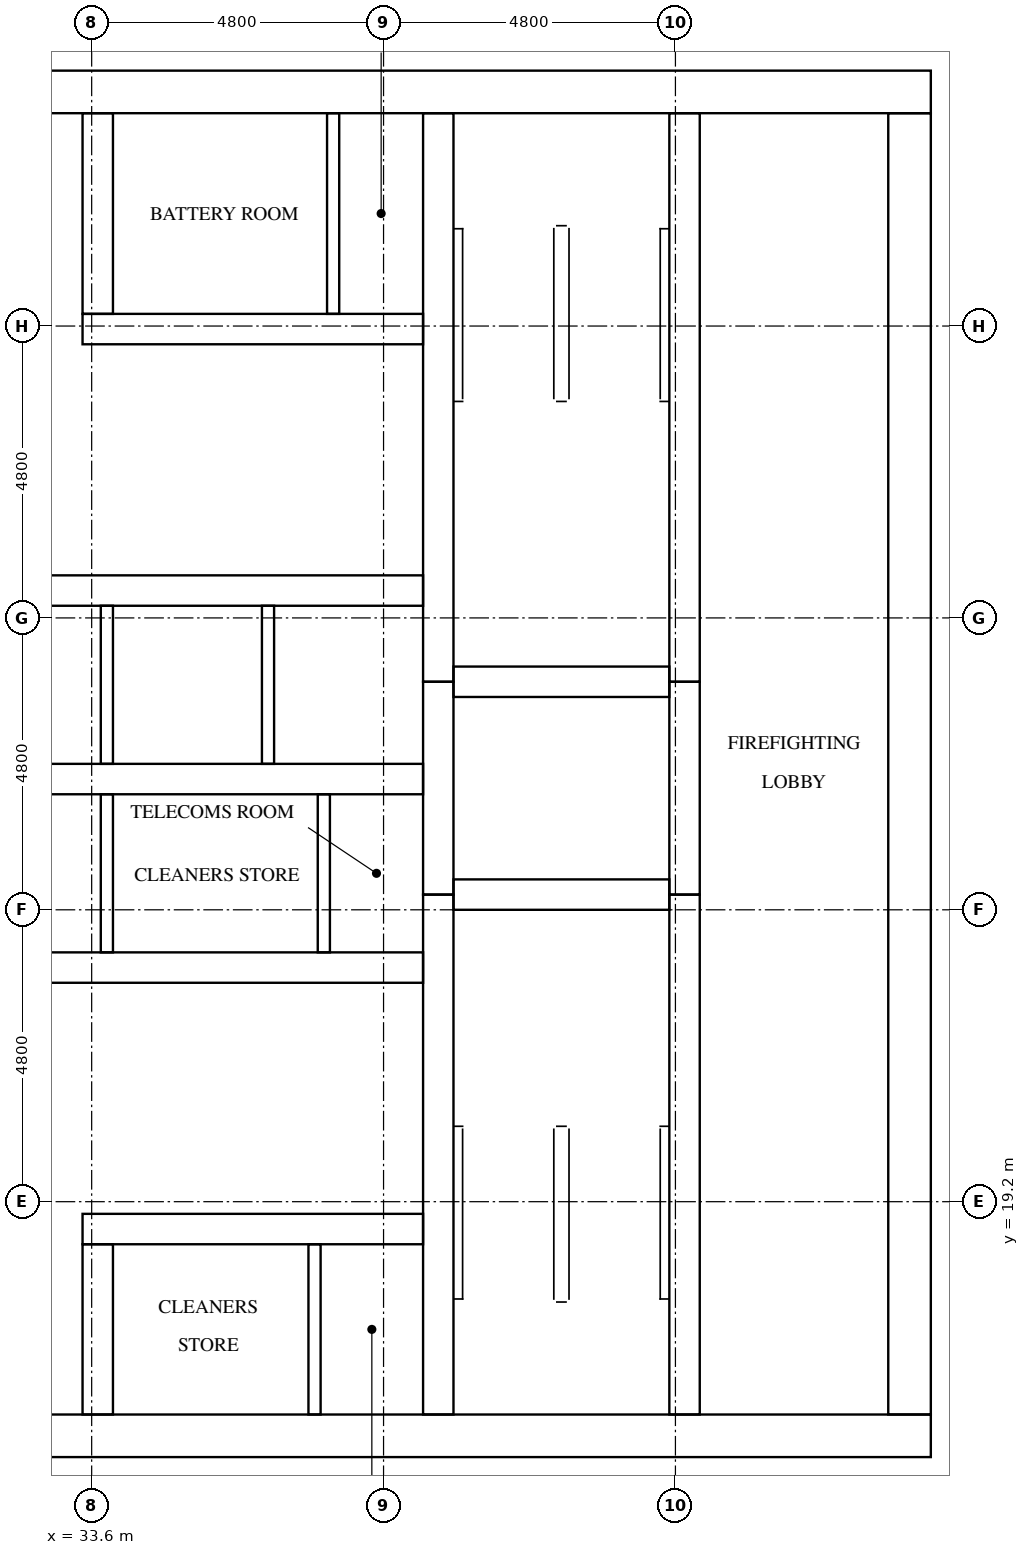
"""IFC4 building model, lengths in metres.
Left out: names, types, materials, properties, quantities, classifications, styles, units other than length and angle.
Written with IfcOpenShell. Run it as: python <this file> out.ifc"""

import sys

from ifc_helpers import new_model, si_unit, direction, frame, frame_2d, origin, place, context, subcontext, project, spatial, rectangle, extrude, element, fill, save


model = new_model("IFC4")
c1 = context("Model", 3, precision=1e-05, world=origin(), true_north=direction((0.0, 1.0)))
c2 = subcontext(c1, "Body", "Model", "MODEL_VIEW")
j1 = project(units=[si_unit("LENGTHUNIT", "METRE"), si_unit("PLANEANGLEUNIT", "RADIAN")], contexts=[c1])
p1 = place(None, origin())
s1 = spatial("IfcSite", under=j1, at=p1, CompositionType="ELEMENT")
p2 = place(p1, origin())
s2 = spatial("IfcBuilding", under=s1, at=p2, CompositionType="ELEMENT")
p3 = place(p2, frame((0.0, 0.0, 226.3)))
s3 = spatial("IfcBuildingStorey", under=s2, at=p3, CompositionType="ELEMENT", Elevation=226.3)
p4 = place(p3, frame((15.0, 15.35, 0.0), z_axis=(0.0, 0.0, 1.0), x_axis=(1.0, 0.0, 0.0)))
e1 = element("IfcWall", 1, at=p4, inside=s3, PredefinedType="SHEAR", context=c2, shape_type="SweptSolid", body=[
    extrude(rectangle(XDim=32.4, YDim=0.7, at=frame_2d((16.2, 0.0))), origin(), (0.0, 0.0, 1.0), 3.2),
])
p5 = place(p4, frame((15.3, 0.0, 0.0)))
e2 = element("IfcOpeningElement", 2, at=p5, cuts=e1, PredefinedType="OPENING", context=c2, shape_type="SweptSolid", body=[
    extrude(rectangle(XDim=1.8, YDim=2.1, at=frame_2d((0.9, 1.05))), frame((0.0, 0.36, 0.0), z_axis=(0.0, -1.0, 0.0), x_axis=(1.0, 0.0, 0.0)), (0.0, 0.0, 1.0), 0.72),
])
p6 = place(p3, frame((15.0, 37.45, 0.0), z_axis=(0.0, 0.0, 1.0), x_axis=(1.0, 0.0, 0.0)))
e3 = element("IfcWall", 3, at=p6, inside=s3, PredefinedType="SHEAR", context=c2, shape_type="SweptSolid", body=[
    extrude(rectangle(XDim=32.4, YDim=0.7, at=frame_2d((16.2, 0.0))), origin(), (0.0, 0.0, 1.0), 3.2),
])
p7 = place(p6, frame((15.3, 0.0, 0.0)))
e4 = element("IfcOpeningElement", 4, at=p7, cuts=e3, PredefinedType="OPENING", context=c2, shape_type="SweptSolid", body=[
    extrude(rectangle(XDim=1.8, YDim=2.1, at=frame_2d((0.9, 1.05))), frame((0.0, 0.36, 0.0), z_axis=(0.0, -1.0, 0.0), x_axis=(1.0, 0.0, 0.0)), (0.0, 0.0, 1.0), 0.72),
])
p8 = place(p6, frame((1.544, 0.0, 0.0)))
e5 = element("IfcOpeningElement", 5, at=p8, cuts=e3, PredefinedType="OPENING", context=c2, shape_type="SweptSolid", body=[
    extrude(rectangle(XDim=1.0, YDim=2.1, at=frame_2d((0.5, 1.05))), frame((0.0, 0.36, 0.0), z_axis=(0.0, -1.0, 0.0), x_axis=(1.0, 0.0, 0.0)), (0.0, 0.0, 1.0), 0.72),
])
p9 = place(p6, frame((5.219, 0.0, 0.0)))
e6 = element("IfcOpeningElement", 6, at=p9, cuts=e3, PredefinedType="OPENING", context=c2, shape_type="SweptSolid", body=[
    extrude(rectangle(XDim=1.0, YDim=2.1, at=frame_2d((0.5, 1.05))), frame((0.0, 0.36, 0.0), z_axis=(0.0, -1.0, 0.0), x_axis=(1.0, 0.0, 0.0)), (0.0, 0.0, 1.0), 0.72),
])
p10 = place(p3, frame((47.05, 15.7, 0.0), z_axis=(0.0, 0.0, 1.0), x_axis=(0.0, 1.0, 0.0)))
e7 = element("IfcWall", 7, at=p10, inside=s3, PredefinedType="SHEAR", context=c2, shape_type="SweptSolid", body=[
    extrude(rectangle(XDim=21.4, YDim=0.7, at=frame_2d((10.7, 0.0))), origin(), (0.0, 0.0, 1.0), 3.2),
])
p11 = place(p10, frame((10.4, 0.0, 0.0)))
e8 = element("IfcOpeningElement", 8, at=p11, cuts=e7, PredefinedType="OPENING", context=c2, shape_type="SweptSolid", body=[
    extrude(rectangle(XDim=1.2, YDim=2.1, at=frame_2d((0.6, 1.05))), frame((0.0, 0.36, 0.0), z_axis=(0.0, -1.0, 0.0), x_axis=(1.0, 0.0, 0.0)), (0.0, 0.0, 1.0), 0.72),
])
p12 = place(p3, frame((39.3, 15.7, 0.0), z_axis=(0.0, 0.0, 1.0), x_axis=(0.0, 1.0, 0.0)))
e9 = element("IfcWall", 9, at=p12, inside=s3, PredefinedType="SHEAR", context=c2, shape_type="SweptSolid", body=[
    extrude(rectangle(XDim=8.55, YDim=0.5, at=frame_2d((4.275, 0.0))), origin(), (0.0, 0.0, 1.0), 3.2),
])
p13 = place(p3, frame((39.3, 24.25, 0.0), z_axis=(0.0, 0.0, 1.0), x_axis=(0.0, 1.0, 0.0)))
e10 = element("IfcWall", 10, at=p13, inside=s3, PredefinedType="SHEAR", context=c2, shape_type="SweptSolid", body=[
    extrude(rectangle(XDim=3.5, YDim=0.5, at=frame_2d((1.75, 0.0))), origin(), (0.0, 0.0, 1.0), 3.2),
])
p14 = place(p3, frame((39.3, 27.75, 0.0), z_axis=(0.0, 0.0, 1.0), x_axis=(0.0, 1.0, 0.0)))
e11 = element("IfcWall", 11, at=p14, inside=s3, PredefinedType="SHEAR", context=c2, shape_type="SweptSolid", body=[
    extrude(rectangle(XDim=9.35, YDim=0.5, at=frame_2d((4.675, 0.0))), origin(), (0.0, 0.0, 1.0), 3.2),
])
p15 = place(p3, frame((43.35, 15.7, 0.0), z_axis=(0.0, 0.0, 1.0), x_axis=(0.0, 1.0, 0.0)))
e12 = element("IfcWall", 12, at=p15, inside=s3, PredefinedType="SHEAR", context=c2, shape_type="SweptSolid", body=[
    extrude(rectangle(XDim=8.55, YDim=0.5, at=frame_2d((4.275, 0.0))), origin(), (0.0, 0.0, 1.0), 3.2),
])
p16 = place(p15, frame((0.5, 0.0, 0.0)))
e13 = element("IfcOpeningElement", 13, at=p16, cuts=e12, PredefinedType="OPENING", context=c2, shape_type="SweptSolid", body=[
    extrude(rectangle(XDim=1.2, YDim=2.1, at=frame_2d((0.6, 1.05))), frame((0.0, 0.26, 0.0), z_axis=(0.0, -1.0, 0.0), x_axis=(1.0, 0.0, 0.0)), (0.0, 0.0, 1.0), 0.52),
])
p17 = place(p3, frame((43.35, 24.25, 0.0), z_axis=(0.0, 0.0, 1.0), x_axis=(0.0, 1.0, 0.0)))
e14 = element("IfcWall", 14, at=p17, inside=s3, PredefinedType="SHEAR", context=c2, shape_type="SweptSolid", body=[
    extrude(rectangle(XDim=3.5, YDim=0.5, at=frame_2d((1.75, 0.0))), origin(), (0.0, 0.0, 1.0), 3.2),
])
p18 = place(p17, frame((1.2, 0.0, 0.0)))
e15 = element("IfcOpeningElement", 15, at=p18, cuts=e14, PredefinedType="OPENING", context=c2, shape_type="SweptSolid", body=[
    extrude(rectangle(XDim=1.1, YDim=2.1, at=frame_2d((0.55, 1.05))), frame((0.0, 0.26, 0.0), z_axis=(0.0, -1.0, 0.0), x_axis=(1.0, 0.0, 0.0)), (0.0, 0.0, 1.0), 0.52),
])
p19 = place(p3, frame((43.35, 27.75, 0.0), z_axis=(0.0, 0.0, 1.0), x_axis=(0.0, 1.0, 0.0)))
e16 = element("IfcWall", 16, at=p19, inside=s3, PredefinedType="SHEAR", context=c2, shape_type="SweptSolid", body=[
    extrude(rectangle(XDim=9.35, YDim=0.5, at=frame_2d((4.675, 0.0))), origin(), (0.0, 0.0, 1.0), 3.2),
])
p20 = place(p19, frame((7.65, 0.0, 0.0)))
e17 = element("IfcOpeningElement", 17, at=p20, cuts=e16, PredefinedType="OPENING", context=c2, shape_type="SweptSolid", body=[
    extrude(rectangle(XDim=1.2, YDim=2.1, at=frame_2d((0.6, 1.05))), frame((0.0, 0.26, 0.0), z_axis=(0.0, -1.0, 0.0), x_axis=(1.0, 0.0, 0.0)), (0.0, 0.0, 1.0), 0.52),
])
for number, where, z_axis, x_axis in (
    (18, (39.55, 24.25, 0.0), (0.0, 0.0, 1.0), (1.0, 0.0, 0.0)),
    (19, (39.55, 27.75, 0.0), (0.0, 0.0, 1.0), (1.0, 0.0, 0.0)),
):
    element("IfcWall", number, at=place(p3, frame(where, z_axis=z_axis, x_axis=x_axis)), inside=s3, PredefinedType="SHEAR", context=c2, shape_type="SweptSolid", body=[
        extrude(rectangle(XDim=3.55, YDim=0.5, at=frame_2d((1.775, 0.0))), origin(), (0.0, 0.0, 1.0), 3.2),
    ])
p21 = place(p3, frame((33.45, 18.75, 0.0), z_axis=(0.0, 0.0, 1.0), x_axis=(1.0, 0.0, 0.0)))
e20 = element("IfcWall", 20, at=p21, inside=s3, PredefinedType="SHEAR", context=c2, shape_type="SweptSolid", body=[
    extrude(rectangle(XDim=5.6, YDim=0.5, at=frame_2d((2.8, 0.0))), origin(), (0.0, 0.0, 1.0), 3.2),
])
p22 = place(p21, frame((1.607, 0.0, 0.0)))
e21 = element("IfcOpeningElement", 21, at=p22, cuts=e20, PredefinedType="OPENING", context=c2, shape_type="SweptSolid", body=[
    extrude(rectangle(XDim=1.0, YDim=2.1, at=frame_2d((0.5, 1.05))), frame((0.0, 0.26, 0.0), z_axis=(0.0, -1.0, 0.0), x_axis=(1.0, 0.0, 0.0)), (0.0, 0.0, 1.0), 0.52),
])
p23 = place(p21, frame((4.258, 0.0, 0.0)))
e22 = element("IfcOpeningElement", 22, at=p23, cuts=e20, PredefinedType="OPENING", context=c2, shape_type="SweptSolid", body=[
    extrude(rectangle(XDim=1.0, YDim=2.1, at=frame_2d((0.5, 1.05))), frame((0.0, 0.26, 0.0), z_axis=(0.0, -1.0, 0.0), x_axis=(1.0, 0.0, 0.0)), (0.0, 0.0, 1.0), 0.52),
])
p24 = place(p3, frame((23.35, 23.05, 0.0), z_axis=(0.0, 0.0, 1.0), x_axis=(1.0, 0.0, 0.0)))
e23 = element("IfcWall", 23, at=p24, inside=s3, PredefinedType="SHEAR", context=c2, shape_type="SweptSolid", body=[
    extrude(rectangle(XDim=15.7, YDim=0.5, at=frame_2d((7.85, 0.0))), origin(), (0.0, 0.0, 1.0), 3.2),
])
p25 = place(p24, frame((2.05, 0.0, 0.0)))
e24 = element("IfcOpeningElement", 24, at=p25, cuts=e23, PredefinedType="OPENING", context=c2, shape_type="SweptSolid", body=[
    extrude(rectangle(XDim=1.0, YDim=2.1, at=frame_2d((0.5, 1.05))), frame((0.0, 0.26, 0.0), z_axis=(0.0, -1.0, 0.0), x_axis=(1.0, 0.0, 0.0)), (0.0, 0.0, 1.0), 0.52),
])
p26 = place(p24, frame((11.784, 0.0, 0.0)))
e25 = element("IfcOpeningElement", 25, at=p26, cuts=e23, PredefinedType="OPENING", context=c2, shape_type="SweptSolid", body=[
    extrude(rectangle(XDim=1.0, YDim=2.1, at=frame_2d((0.5, 1.05))), frame((0.0, 0.26, 0.0), z_axis=(0.0, -1.0, 0.0), x_axis=(1.0, 0.0, 0.0)), (0.0, 0.0, 1.0), 0.52),
])
p27 = place(p24, frame((14.434, 0.0, 0.0)))
e26 = element("IfcOpeningElement", 26, at=p27, cuts=e23, PredefinedType="OPENING", context=c2, shape_type="SweptSolid", body=[
    extrude(rectangle(XDim=1.0, YDim=2.1, at=frame_2d((0.5, 1.05))), frame((0.0, 0.26, 0.0), z_axis=(0.0, -1.0, 0.0), x_axis=(1.0, 0.0, 0.0)), (0.0, 0.0, 1.0), 0.52),
])
p28 = place(p3, frame((23.35, 26.15, 0.0), z_axis=(0.0, 0.0, 1.0), x_axis=(1.0, 0.0, 0.0)))
e27 = element("IfcWall", 27, at=p28, inside=s3, PredefinedType="SHEAR", context=c2, shape_type="SweptSolid", body=[
    extrude(rectangle(XDim=15.7, YDim=0.5, at=frame_2d((7.85, 0.0))), origin(), (0.0, 0.0, 1.0), 3.2),
])
p29 = place(p3, frame((23.35, 29.25, 0.0), z_axis=(0.0, 0.0, 1.0), x_axis=(1.0, 0.0, 0.0)))
e28 = element("IfcWall", 28, at=p29, inside=s3, PredefinedType="SHEAR", context=c2, shape_type="SweptSolid", body=[
    extrude(rectangle(XDim=15.7, YDim=0.5, at=frame_2d((7.85, 0.0))), origin(), (0.0, 0.0, 1.0), 3.2),
])
p30 = place(p29, frame((0.675, 0.0, 0.0)))
e29 = element("IfcOpeningElement", 29, at=p30, cuts=e28, PredefinedType="OPENING", context=c2, shape_type="SweptSolid", body=[
    extrude(rectangle(XDim=1.1, YDim=2.1, at=frame_2d((0.55, 1.05))), frame((0.0, 0.26, 0.0), z_axis=(0.0, -1.0, 0.0), x_axis=(1.0, 0.0, 0.0)), (0.0, 0.0, 1.0), 0.52),
])
p31 = place(p29, frame((3.325, 0.0, 0.0)))
e30 = element("IfcOpeningElement", 30, at=p31, cuts=e28, PredefinedType="OPENING", context=c2, shape_type="SweptSolid", body=[
    extrude(rectangle(XDim=1.1, YDim=2.1, at=frame_2d((0.55, 1.05))), frame((0.0, 0.26, 0.0), z_axis=(0.0, -1.0, 0.0), x_axis=(1.0, 0.0, 0.0)), (0.0, 0.0, 1.0), 0.52),
])
p32 = place(p29, frame((5.975, 0.0, 0.0)))
e31 = element("IfcOpeningElement", 31, at=p32, cuts=e28, PredefinedType="OPENING", context=c2, shape_type="SweptSolid", body=[
    extrude(rectangle(XDim=1.1, YDim=2.1, at=frame_2d((0.55, 1.05))), frame((0.0, 0.26, 0.0), z_axis=(0.0, -1.0, 0.0), x_axis=(1.0, 0.0, 0.0)), (0.0, 0.0, 1.0), 0.52),
])
p33 = place(p29, frame((8.625, 0.0, 0.0)))
e32 = element("IfcOpeningElement", 32, at=p33, cuts=e28, PredefinedType="OPENING", context=c2, shape_type="SweptSolid", body=[
    extrude(rectangle(XDim=1.1, YDim=2.1, at=frame_2d((0.55, 1.05))), frame((0.0, 0.26, 0.0), z_axis=(0.0, -1.0, 0.0), x_axis=(1.0, 0.0, 0.0)), (0.0, 0.0, 1.0), 0.52),
])
p34 = place(p29, frame((11.275, 0.0, 0.0)))
e33 = element("IfcOpeningElement", 33, at=p34, cuts=e28, PredefinedType="OPENING", context=c2, shape_type="SweptSolid", body=[
    extrude(rectangle(XDim=1.1, YDim=2.1, at=frame_2d((0.55, 1.05))), frame((0.0, 0.26, 0.0), z_axis=(0.0, -1.0, 0.0), x_axis=(1.0, 0.0, 0.0)), (0.0, 0.0, 1.0), 0.52),
])
p35 = place(p29, frame((13.925, 0.0, 0.0)))
e34 = element("IfcOpeningElement", 34, at=p35, cuts=e28, PredefinedType="OPENING", context=c2, shape_type="SweptSolid", body=[
    extrude(rectangle(XDim=1.1, YDim=2.1, at=frame_2d((0.55, 1.05))), frame((0.0, 0.26, 0.0), z_axis=(0.0, -1.0, 0.0), x_axis=(1.0, 0.0, 0.0)), (0.0, 0.0, 1.0), 0.52),
])
p36 = place(p3, frame((33.45, 33.55, 0.0), z_axis=(0.0, 0.0, 1.0), x_axis=(1.0, 0.0, 0.0)))
e35 = element("IfcWall", 35, at=p36, inside=s3, PredefinedType="SHEAR", context=c2, shape_type="SweptSolid", body=[
    extrude(rectangle(XDim=5.6, YDim=0.5, at=frame_2d((2.8, 0.0))), origin(), (0.0, 0.0, 1.0), 3.2),
])
p37 = place(p36, frame((1.76, 0.0, 0.0)))
e36 = element("IfcOpeningElement", 36, at=p37, cuts=e35, PredefinedType="OPENING", context=c2, shape_type="SweptSolid", body=[
    extrude(rectangle(XDim=1.0, YDim=2.1, at=frame_2d((0.5, 1.05))), frame((0.0, 0.26, 0.0), z_axis=(0.0, -1.0, 0.0), x_axis=(1.0, 0.0, 0.0)), (0.0, 0.0, 1.0), 0.52),
])
p38 = place(p36, frame((4.41, 0.0, 0.0)))
e37 = element("IfcOpeningElement", 37, at=p38, cuts=e35, PredefinedType="OPENING", context=c2, shape_type="SweptSolid", body=[
    extrude(rectangle(XDim=1.0, YDim=2.1, at=frame_2d((0.5, 1.05))), frame((0.0, 0.26, 0.0), z_axis=(0.0, -1.0, 0.0), x_axis=(1.0, 0.0, 0.0)), (0.0, 0.0, 1.0), 0.52),
])
p39 = place(p3, frame((33.7, 15.7, 0.0), z_axis=(0.0, 0.0, 1.0), x_axis=(0.0, 1.0, 0.0)))
e38 = element("IfcWall", 38, at=p39, inside=s3, PredefinedType="SHEAR", context=c2, shape_type="SweptSolid", body=[
    extrude(rectangle(XDim=2.8, YDim=0.5, at=frame_2d((1.4, 0.0))), origin(), (0.0, 0.0, 1.0), 3.2),
])
p40 = place(p3, frame((33.7, 33.8, 0.0), z_axis=(0.0, 0.0, 1.0), x_axis=(0.0, 1.0, 0.0)))
e39 = element("IfcWall", 39, at=p40, inside=s3, PredefinedType="SHEAR", context=c2, shape_type="SweptSolid", body=[
    extrude(rectangle(XDim=3.3, YDim=0.5, at=frame_2d((1.65, 0.0))), origin(), (0.0, 0.0, 1.0), 3.2),
])
p41 = place(p3, frame((33.85, 23.3, 0.0), z_axis=(0.0, 0.0, 1.0), x_axis=(0.0, 1.0, 0.0)))
e40 = element("IfcWall", 40, at=p41, inside=s3, PredefinedType="SOLIDWALL", context=c2, shape_type="SweptSolid", body=[
    extrude(rectangle(XDim=2.6, YDim=0.2, at=frame_2d((1.3, 0.0))), origin(), (0.0, 0.0, 1.0), 3.2),
])
for number, where, z_axis, x_axis in (
    (41, (33.85, 26.4, 0.0), (0.0, 0.0, 1.0), (0.0, 1.0, 0.0)),
    (42, (36.5, 26.4, 0.0), (0.0, 0.0, 1.0), (0.0, 1.0, 0.0)),
):
    element("IfcWall", number, at=place(p3, frame(where, z_axis=z_axis, x_axis=x_axis)), inside=s3, PredefinedType="SOLIDWALL", context=c2, shape_type="SweptSolid", body=[
        extrude(rectangle(XDim=2.6, YDim=0.2, at=frame_2d((1.3, 0.0))), origin(), (0.0, 0.0, 1.0), 3.2),
    ])
p42 = place(p3, frame((37.418, 23.3, 0.0), z_axis=(0.0, 0.0, 1.0), x_axis=(0.0, 1.0, 0.0)))
e43 = element("IfcWall", 43, at=p42, inside=s3, PredefinedType="PARTITIONING", context=c2, shape_type="SweptSolid", body=[
    extrude(rectangle(XDim=2.6, YDim=0.2, at=frame_2d((1.3, 0.0))), origin(), (0.0, 0.0, 1.0), 3.2),
])
p43 = place(p3, frame((37.265, 15.7, 0.0), z_axis=(0.0, 0.0, 1.0), x_axis=(0.0, 1.0, 0.0)))
e44 = element("IfcWall", 44, at=p43, inside=s3, PredefinedType="PARTITIONING", context=c2, shape_type="SweptSolid", body=[
    extrude(rectangle(XDim=2.8, YDim=0.2, at=frame_2d((1.4, 0.0))), origin(), (0.0, 0.0, 1.0), 3.2),
])
p44 = place(p3, frame((37.571, 33.8, 0.0), z_axis=(0.0, 0.0, 1.0), x_axis=(0.0, 1.0, 0.0)))
e45 = element("IfcWall", 45, at=p44, inside=s3, PredefinedType="PARTITIONING", context=c2, shape_type="SweptSolid", body=[
    extrude(rectangle(XDim=3.3, YDim=0.2, at=frame_2d((1.65, 0.0))), origin(), (0.0, 0.0, 1.0), 3.2),
])
p45 = place(p33, origin())
e46 = element("IfcDoor", 46, at=p45, inside=s3, OperationType="DOUBLE_DOOR_SLIDING", PredefinedType="DOOR", context=c2, shape_type="SweptSolid", body=[
    extrude(rectangle(XDim=1.1, YDim=2.1, at=frame_2d((0.55, 1.05))), frame((0.0, 0.025, 0.0), z_axis=(0.0, -1.0, 0.0), x_axis=(1.0, 0.0, 0.0)), (0.0, 0.0, 1.0), 0.05),
])
fill(e32, e46)
p46 = place(p34, origin())
e47 = element("IfcDoor", 47, at=p46, inside=s3, OperationType="DOUBLE_DOOR_SLIDING", PredefinedType="DOOR", context=c2, shape_type="SweptSolid", body=[
    extrude(rectangle(XDim=1.1, YDim=2.1, at=frame_2d((0.55, 1.05))), frame((0.0, 0.025, 0.0), z_axis=(0.0, -1.0, 0.0), x_axis=(1.0, 0.0, 0.0)), (0.0, 0.0, 1.0), 0.05),
])
fill(e33, e47)
p47 = place(p35, origin())
e48 = element("IfcDoor", 48, at=p47, inside=s3, OperationType="DOUBLE_DOOR_SLIDING", PredefinedType="DOOR", context=c2, shape_type="SweptSolid", body=[
    extrude(rectangle(XDim=1.1, YDim=2.1, at=frame_2d((0.55, 1.05))), frame((0.0, 0.025, 0.0), z_axis=(0.0, -1.0, 0.0), x_axis=(1.0, 0.0, 0.0)), (0.0, 0.0, 1.0), 0.05),
])
fill(e34, e48)
p48 = place(p18, origin())
e49 = element("IfcDoor", 49, at=p48, inside=s3, OperationType="DOUBLE_DOOR_SLIDING", PredefinedType="DOOR", context=c2, shape_type="SweptSolid", body=[
    extrude(rectangle(XDim=1.1, YDim=2.1, at=frame_2d((0.55, 1.05))), frame((0.0, 0.025, 0.0), z_axis=(0.0, -1.0, 0.0), x_axis=(1.0, 0.0, 0.0)), (0.0, 0.0, 1.0), 0.05),
])
fill(e15, e49)
p49 = place(p16, origin())
e50 = element("IfcDoor", 50, at=p49, inside=s3, OperationType="SINGLE_SWING_RIGHT", PredefinedType="DOOR", context=c2, shape_type="SweptSolid", body=[
    extrude(rectangle(XDim=1.2, YDim=2.1, at=frame_2d((0.6, 1.05))), frame((0.0, 0.025, 0.0), z_axis=(0.0, -1.0, 0.0), x_axis=(1.0, 0.0, 0.0)), (0.0, 0.0, 1.0), 0.05),
])
fill(e13, e50)
p50 = place(p20, origin())
e51 = element("IfcDoor", 51, at=p50, inside=s3, OperationType="SINGLE_SWING_LEFT", PredefinedType="DOOR", context=c2, shape_type="SweptSolid", body=[
    extrude(rectangle(XDim=1.2, YDim=2.1, at=frame_2d((0.6, 1.05))), frame((0.0, 0.025, 0.0), z_axis=(0.0, -1.0, 0.0), x_axis=(1.0, 0.0, 0.0)), (0.0, 0.0, 1.0), 0.05),
])
fill(e17, e51)
p51 = place(p11, origin())
e52 = element("IfcDoor", 52, at=p51, inside=s3, OperationType="SINGLE_SWING_LEFT", PredefinedType="DOOR", context=c2, shape_type="SweptSolid", body=[
    extrude(rectangle(XDim=1.2, YDim=2.1, at=frame_2d((0.6, 1.05))), frame((0.0, 0.025, 0.0), z_axis=(0.0, -1.0, 0.0), x_axis=(1.0, 0.0, 0.0)), (0.0, 0.0, 1.0), 0.05),
])
fill(e8, e52)
p52 = place(p26, frame((1.0, 0.0, 0.0), z_axis=(0.0, 0.0, 1.0), x_axis=(-1.0, 0.0, 0.0)))
e53 = element("IfcDoor", 53, at=p52, inside=s3, OperationType="SINGLE_SWING_LEFT", PredefinedType="DOOR", context=c2, shape_type="SweptSolid", body=[
    extrude(rectangle(XDim=1.0, YDim=2.1, at=frame_2d((0.5, 1.05))), frame((0.0, 0.025, 0.0), z_axis=(0.0, -1.0, 0.0), x_axis=(1.0, 0.0, 0.0)), (0.0, 0.0, 1.0), 0.05),
])
fill(e25, e53)
p53 = place(p27, frame((1.0, 0.0, 0.0), z_axis=(0.0, 0.0, 1.0), x_axis=(-1.0, 0.0, 0.0)))
e54 = element("IfcDoor", 54, at=p53, inside=s3, OperationType="SINGLE_SWING_RIGHT", PredefinedType="DOOR", context=c2, shape_type="SweptSolid", body=[
    extrude(rectangle(XDim=1.0, YDim=2.1, at=frame_2d((0.5, 1.05))), frame((0.0, 0.025, 0.0), z_axis=(0.0, -1.0, 0.0), x_axis=(1.0, 0.0, 0.0)), (0.0, 0.0, 1.0), 0.05),
])
fill(e26, e54)
p54 = place(p22, origin())
e55 = element("IfcDoor", 55, at=p54, inside=s3, OperationType="SINGLE_SWING_LEFT", PredefinedType="DOOR", context=c2, shape_type="SweptSolid", body=[
    extrude(rectangle(XDim=1.0, YDim=2.1, at=frame_2d((0.5, 1.05))), frame((0.0, 0.025, 0.0), z_axis=(0.0, -1.0, 0.0), x_axis=(1.0, 0.0, 0.0)), (0.0, 0.0, 1.0), 0.05),
])
fill(e21, e55)
p55 = place(p23, origin())
e56 = element("IfcDoor", 56, at=p55, inside=s3, OperationType="SINGLE_SWING_RIGHT", PredefinedType="DOOR", context=c2, shape_type="SweptSolid", body=[
    extrude(rectangle(XDim=1.0, YDim=2.1, at=frame_2d((0.5, 1.05))), frame((0.0, 0.025, 0.0), z_axis=(0.0, -1.0, 0.0), x_axis=(1.0, 0.0, 0.0)), (0.0, 0.0, 1.0), 0.05),
])
fill(e22, e56)
p56 = place(p37, frame((1.0, 0.0, 0.0), z_axis=(0.0, 0.0, 1.0), x_axis=(-1.0, 0.0, 0.0)))
e57 = element("IfcDoor", 57, at=p56, inside=s3, OperationType="SINGLE_SWING_LEFT", PredefinedType="DOOR", context=c2, shape_type="SweptSolid", body=[
    extrude(rectangle(XDim=1.0, YDim=2.1, at=frame_2d((0.5, 1.05))), frame((0.0, 0.025, 0.0), z_axis=(0.0, -1.0, 0.0), x_axis=(1.0, 0.0, 0.0)), (0.0, 0.0, 1.0), 0.05),
])
fill(e36, e57)
p57 = place(p38, frame((1.0, 0.0, 0.0), z_axis=(0.0, 0.0, 1.0), x_axis=(-1.0, 0.0, 0.0)))
e58 = element("IfcDoor", 58, at=p57, inside=s3, OperationType="SINGLE_SWING_RIGHT", PredefinedType="DOOR", context=c2, shape_type="SweptSolid", body=[
    extrude(rectangle(XDim=1.0, YDim=2.1, at=frame_2d((0.5, 1.05))), frame((0.0, 0.025, 0.0), z_axis=(0.0, -1.0, 0.0), x_axis=(1.0, 0.0, 0.0)), (0.0, 0.0, 1.0), 0.05),
])
fill(e37, e58)
save(model, sys.argv[1])
